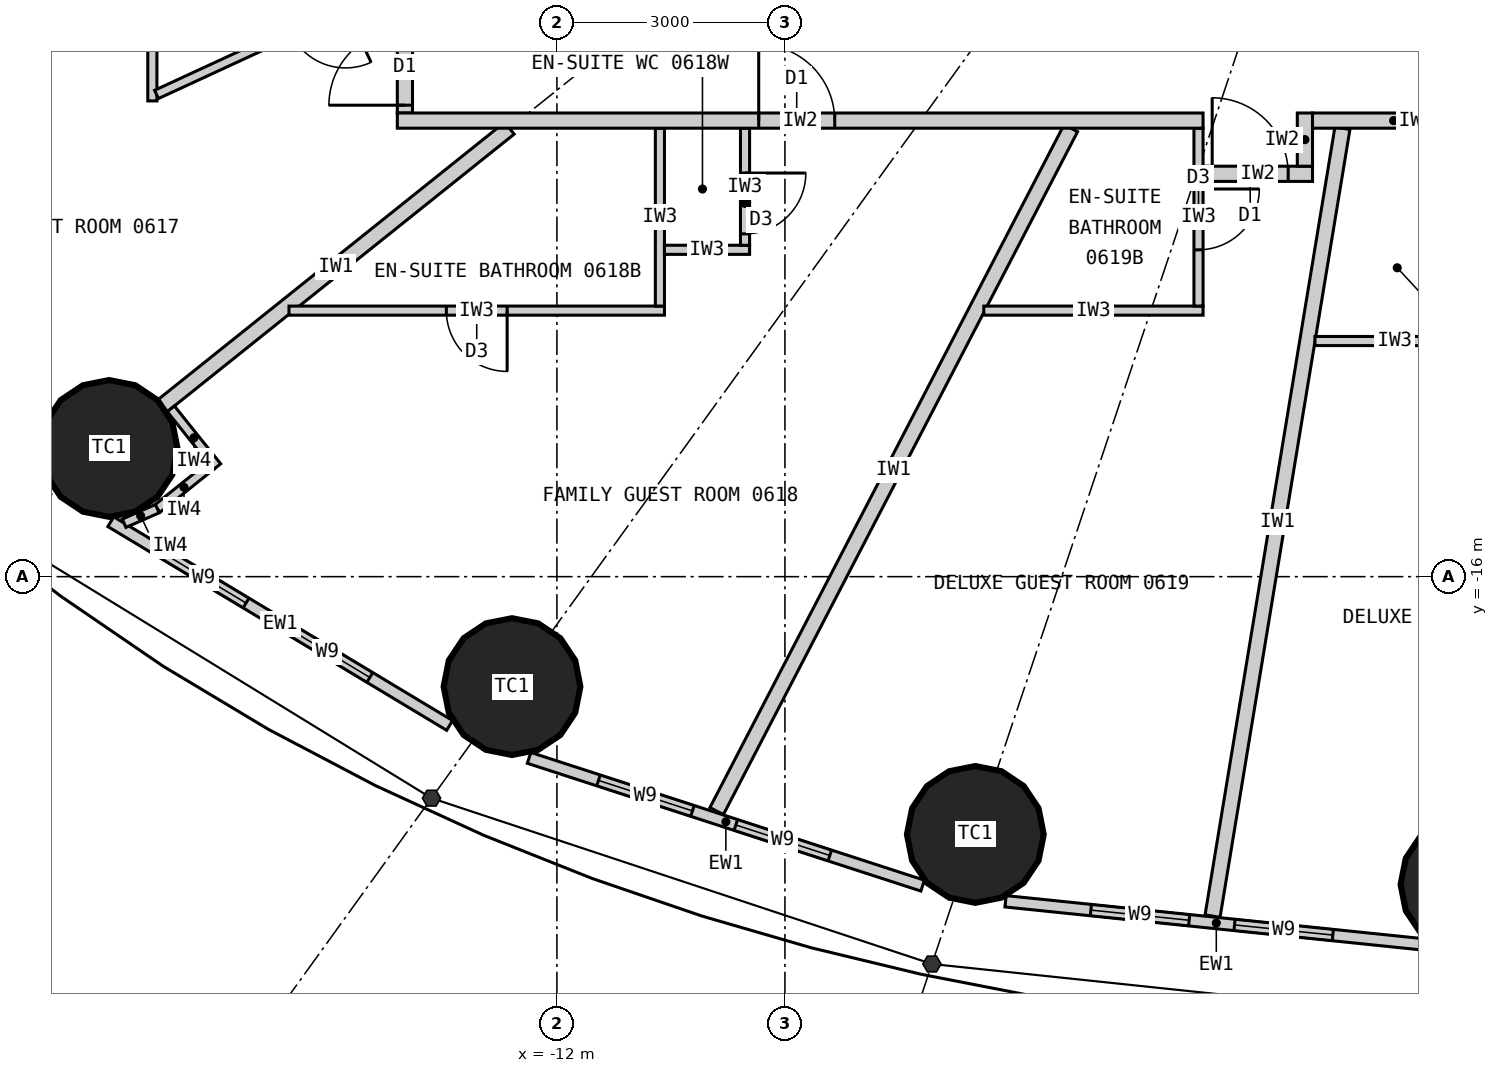
"""IFC4 building model, lengths in metres.
Left out: names, types, materials, properties, quantities, classifications, styles, units other than length and angle.
Written with IfcOpenShell. Run it as: python <this file> out.ifc"""

import sys

from ifc_helpers import new_model, si_unit, direction, frame, frame_2d, origin, origin_2d, place, context, subcontext, project, spatial, rectangle, circle, extrude, element, fill, save


model = new_model("IFC4")
c1 = context("Model", 3, precision=1e-05, world=origin(), true_north=direction((0.0, 1.0)))
c2 = subcontext(c1, "Body", "Model", "MODEL_VIEW")
j1 = project(units=[si_unit("LENGTHUNIT", "METRE"), si_unit("PLANEANGLEUNIT", "RADIAN")], contexts=[c1])
p1 = place(None, origin())
s1 = spatial("IfcSite", under=j1, at=p1, CompositionType="ELEMENT")
p2 = place(p1, origin())
s2 = spatial("IfcBuilding", under=s1, at=p2, CompositionType="ELEMENT")
p3 = place(p2, frame((0.0, 0.0, 32.7)))
s3 = spatial("IfcBuildingStorey", under=s2, at=p3, CompositionType="ELEMENT", Elevation=32.7)
for number, where, z_axis, x_axis in (
    (1, (-17.892, -14.313, 0.0), (0.0, 0.0, 1.0), (1.0, 0.0, 0.0)),
    (2, (-12.591, -17.447, 0.0), (0.0, 0.0, 1.0), (1.0, 0.0, 0.0)),
    (3, (-6.495, -19.391, 0.0), (0.0, 0.0, 1.0), (1.0, 0.0, 0.0)),
    (4, (0.0, -20.05, 0.0), (0.0, 0.0, 1.0), (1.0, 0.0, 0.0)),
):
    element("IfcColumn", number, at=place(p3, frame(where, z_axis=z_axis, x_axis=x_axis)), inside=s3, PredefinedType="COLUMN", context=c2, shape_type="SweptSolid", body=[
        extrude(circle(Radius=0.9, at=origin_2d()), origin(), (0.0, 0.0, 1.0), 3.3),
    ])
p4 = place(p3, frame((-17.869, -15.277, 0.0), z_axis=(0.0, 0.0, 1.0), x_axis=(0.856958191554, -0.515385931054, 0.0)))
e5 = element("IfcWall", 5, at=p4, inside=s3, PredefinedType="ELEMENTEDWALL", context=c2, shape_type="SweptSolid", body=[
    extrude(rectangle(XDim=5.201, YDim=0.15, at=frame_2d((2.601, 0.0))), origin(), (0.0, 0.0, 1.0), 3.12),
])
p5 = place(p4, frame((0.776, 0.0, 0.9)))
e6 = element("IfcOpeningElement", 6, at=p5, cuts=e5, PredefinedType="OPENING", context=c2, shape_type="SweptSolid", body=[
    extrude(rectangle(XDim=1.3, YDim=1.9, at=frame_2d((0.65, 0.95))), frame((0.0, 0.085, 0.0), z_axis=(0.0, -1.0, 0.0), x_axis=(1.0, 0.0, 0.0)), (0.0, 0.0, 1.0), 0.17),
])
p6 = place(p4, frame((2.676, 0.0, 0.9)))
e7 = element("IfcOpeningElement", 7, at=p6, cuts=e5, PredefinedType="OPENING", context=c2, shape_type="SweptSolid", body=[
    extrude(rectangle(XDim=1.3, YDim=1.9, at=frame_2d((0.65, 0.95))), frame((0.0, 0.085, 0.0), z_axis=(0.0, -1.0, 0.0), x_axis=(1.0, 0.0, 0.0)), (0.0, 0.0, 1.0), 0.17),
])
p7 = place(p3, frame((-12.366, -18.384, 0.0), z_axis=(0.0, 0.0, 1.0), x_axis=(0.951138486029, -0.308764603532, 0.0)))
e8 = element("IfcWall", 8, at=p7, inside=s3, PredefinedType="ELEMENTEDWALL", context=c2, shape_type="SweptSolid", body=[
    extrude(rectangle(XDim=5.444, YDim=0.15, at=frame_2d((2.722, 0.0))), origin(), (0.0, 0.0, 1.0), 3.12),
])
p8 = place(p7, frame((0.96, 0.0, 0.9)))
e9 = element("IfcOpeningElement", 9, at=p8, cuts=e8, PredefinedType="OPENING", context=c2, shape_type="SweptSolid", body=[
    extrude(rectangle(XDim=1.3, YDim=1.9, at=frame_2d((0.65, 0.95))), frame((0.0, 0.085, 0.0), z_axis=(0.0, -1.0, 0.0), x_axis=(1.0, 0.0, 0.0)), (0.0, 0.0, 1.0), 0.17),
])
p9 = place(p7, frame((2.86, 0.0, 0.9)))
e10 = element("IfcOpeningElement", 10, at=p9, cuts=e8, PredefinedType="OPENING", context=c2, shape_type="SweptSolid", body=[
    extrude(rectangle(XDim=1.3, YDim=1.9, at=frame_2d((0.65, 0.95))), frame((0.0, 0.085, 0.0), z_axis=(0.0, -1.0, 0.0), x_axis=(1.0, 0.0, 0.0)), (0.0, 0.0, 1.0), 0.17),
])
p10 = place(p3, frame((-6.098, -20.271, 0.0), z_axis=(0.0, 0.0, 1.0), x_axis=(0.994723735084, -0.102589915983, 0.0)))
e11 = element("IfcWall", 11, at=p10, inside=s3, PredefinedType="ELEMENTEDWALL", context=c2, shape_type="SweptSolid", body=[
    extrude(rectangle(XDim=5.576, YDim=0.15, at=frame_2d((2.788, 0.0))), origin(), (0.0, 0.0, 1.0), 3.12),
])
p11 = place(p10, frame((1.129, 0.0, 0.9)))
e12 = element("IfcOpeningElement", 12, at=p11, cuts=e11, PredefinedType="OPENING", context=c2, shape_type="SweptSolid", body=[
    extrude(rectangle(XDim=1.3, YDim=1.9, at=frame_2d((0.65, 0.95))), frame((0.0, 0.085, 0.0), z_axis=(0.0, -1.0, 0.0), x_axis=(1.0, 0.0, 0.0)), (0.0, 0.0, 1.0), 0.17),
])
p12 = place(p10, frame((3.029, 0.0, 0.9)))
e13 = element("IfcOpeningElement", 13, at=p12, cuts=e11, PredefinedType="OPENING", context=c2, shape_type="SweptSolid", body=[
    extrude(rectangle(XDim=1.3, YDim=1.9, at=frame_2d((0.65, 0.95))), frame((0.0, 0.085, 0.0), z_axis=(0.0, -1.0, 0.0), x_axis=(1.0, 0.0, 0.0)), (0.0, 0.0, 1.0), 0.17),
])
p13 = place(p3, frame((-14.1, -6.512, 0.0), z_axis=(0.0, 0.0, 1.0), x_axis=(-0.907842433118, -0.41931147925, 0.0)))
e14 = element("IfcWall", 14, at=p13, inside=s3, PredefinedType="PARTITIONING", context=c2, shape_type="SweptSolid", body=[
    extrude(rectangle(XDim=7.823, YDim=0.2, at=frame_2d((3.912, 0.0))), origin(), (0.0, 0.0, 1.0), 2.32),
])
p14 = place(p3, frame((-12.625, -10.1, 0.0), z_axis=(0.0, 0.0, 1.0), x_axis=(-0.780872884676, -0.624689953479, 0.0)))
e15 = element("IfcWall", 15, at=p14, inside=s3, PredefinedType="PARTITIONING", context=c2, shape_type="SweptSolid", body=[
    extrude(rectangle(XDim=5.845, YDim=0.2, at=frame_2d((2.922, 0.0))), origin(), (0.0, 0.0, 1.0), 2.32),
])
p15 = place(p3, frame((-5.239, -10.1, 0.0), z_axis=(0.0, 0.0, 1.0), x_axis=(-0.460422783389, -0.887699758103, 0.0)))
e16 = element("IfcWall", 16, at=p15, inside=s3, PredefinedType="PARTITIONING", context=c2, shape_type="SweptSolid", body=[
    extrude(rectangle(XDim=10.12, YDim=0.2, at=frame_2d((5.06, 0.0))), origin(), (0.0, 0.0, 1.0), 3.12),
])
p16 = place(p3, frame((-1.665, -10.1, 0.0), z_axis=(0.0, 0.0, 1.0), x_axis=(-0.162657606458, -0.986682574621, 0.0)))
e17 = element("IfcWall", 17, at=p16, inside=s3, PredefinedType="PARTITIONING", context=c2, shape_type="SweptSolid", body=[
    extrude(rectangle(XDim=10.505, YDim=0.2, at=frame_2d((5.252, 0.0))), origin(), (0.0, 0.0, 1.0), 3.12),
])
p17 = place(p3, frame((-17.323, -8.101, 0.0), z_axis=(0.0, 0.0, 1.0), x_axis=(0.0, -1.0, 0.0)))
e18 = element("IfcWall", 18, at=p17, inside=s3, PredefinedType="PARTITIONING", context=c2, shape_type="SweptSolid", body=[
    extrude(rectangle(XDim=1.64, YDim=0.12, at=frame_2d((0.82, 0.0))), origin(), (0.0, 0.0, 1.0), 3.12),
])
p18 = place(p3, frame((-14.1, -8.193, 0.0), z_axis=(0.0, 0.0, 1.0), x_axis=(-0.907836493557, -0.419324338628, 0.0)))
e19 = element("IfcWall", 19, at=p18, inside=s3, PredefinedType="PARTITIONING", context=c2, shape_type="SweptSolid", body=[
    extrude(rectangle(XDim=3.49, YDim=0.12, at=frame_2d((1.745, 0.0))), origin(), (0.0, 0.0, 1.0), 3.12),
])
p19 = place(p18, frame((0.75, 0.0, 0.0)))
e20 = element("IfcOpeningElement", 20, at=p19, cuts=e19, PredefinedType="OPENING", context=c2, shape_type="SweptSolid", body=[
    extrude(rectangle(XDim=0.8, YDim=2.1, at=frame_2d((0.4, 1.05))), frame((0.0, 0.07, 0.0), z_axis=(0.0, -1.0, 0.0), x_axis=(1.0, 0.0, 0.0)), (0.0, 0.0, 1.0), 0.14),
])
p20 = place(p3, frame((-15.525, -12.5, 0.0), z_axis=(0.0, 0.0, 1.0), x_axis=(1.0, 0.0, 0.0)))
e21 = element("IfcWall", 21, at=p20, inside=s3, PredefinedType="PARTITIONING", context=c2, shape_type="SweptSolid", body=[
    extrude(rectangle(XDim=4.94, YDim=0.12, at=frame_2d((2.47, 0.0))), origin(), (0.0, 0.0, 1.0), 3.12),
])
p21 = place(p20, frame((2.07, 0.0, 0.0)))
e22 = element("IfcOpeningElement", 22, at=p21, cuts=e21, PredefinedType="OPENING", context=c2, shape_type="SweptSolid", body=[
    extrude(rectangle(XDim=0.8, YDim=2.1, at=frame_2d((0.4, 1.05))), frame((0.0, 0.07, 0.0), z_axis=(0.0, -1.0, 0.0), x_axis=(1.0, 0.0, 0.0)), (0.0, 0.0, 1.0), 0.14),
])
p22 = place(p3, frame((-10.645, -10.1, 0.0), z_axis=(0.0, 0.0, 1.0), x_axis=(0.0, -1.0, 0.0)))
e23 = element("IfcWall", 23, at=p22, inside=s3, PredefinedType="PARTITIONING", context=c2, shape_type="SweptSolid", body=[
    extrude(rectangle(XDim=2.34, YDim=0.12, at=frame_2d((1.17, 0.0))), origin(), (0.0, 0.0, 1.0), 3.12),
])
p23 = place(p3, frame((-10.585, -11.7, 0.0), z_axis=(0.0, 0.0, 1.0), x_axis=(1.0, 0.0, 0.0)))
e24 = element("IfcWall", 24, at=p23, inside=s3, PredefinedType="PARTITIONING", context=c2, shape_type="SweptSolid", body=[
    extrude(rectangle(XDim=1.12, YDim=0.12, at=frame_2d((0.56, 0.0))), origin(), (0.0, 0.0, 1.0), 3.12),
])
p24 = place(p3, frame((-9.525, -10.1, 0.0), z_axis=(0.0, 0.0, 1.0), x_axis=(0.0, -1.0, 0.0)))
e25 = element("IfcWall", 25, at=p24, inside=s3, PredefinedType="PARTITIONING", context=c2, shape_type="SweptSolid", body=[
    extrude(rectangle(XDim=1.54, YDim=0.12, at=frame_2d((0.77, 0.0))), origin(), (0.0, 0.0, 1.0), 3.12),
])
p25 = place(p24, frame((0.59, 0.0, 0.0)))
e26 = element("IfcOpeningElement", 26, at=p25, cuts=e25, PredefinedType="OPENING", context=c2, shape_type="SweptSolid", body=[
    extrude(rectangle(XDim=0.8, YDim=2.1, at=frame_2d((0.4, 1.05))), frame((0.0, 0.07, 0.0), z_axis=(0.0, -1.0, 0.0), x_axis=(1.0, 0.0, 0.0)), (0.0, 0.0, 1.0), 0.14),
])
p26 = place(p3, frame((-6.383, -12.5, 0.0), z_axis=(0.0, 0.0, 1.0), x_axis=(1.0, 0.0, 0.0)))
e27 = element("IfcWall", 27, at=p26, inside=s3, PredefinedType="PARTITIONING", context=c2, shape_type="SweptSolid", body=[
    extrude(rectangle(XDim=2.885, YDim=0.12, at=frame_2d((1.442, 0.0))), origin(), (0.0, 0.0, 1.0), 3.12),
])
p27 = place(p3, frame((-3.559, -10.1, 0.0), z_axis=(0.0, 0.0, 1.0), x_axis=(0.0, -1.0, 0.0)))
e28 = element("IfcWall", 28, at=p27, inside=s3, PredefinedType="PARTITIONING", context=c2, shape_type="SweptSolid", body=[
    extrude(rectangle(XDim=2.34, YDim=0.12, at=frame_2d((1.17, 0.0))), origin(), (0.0, 0.0, 1.0), 3.12),
])
p28 = place(p27, frame((0.8, 0.0, 0.0)))
e29 = element("IfcOpeningElement", 29, at=p28, cuts=e28, PredefinedType="OPENING", context=c2, shape_type="SweptSolid", body=[
    extrude(rectangle(XDim=0.8, YDim=2.1, at=frame_2d((0.4, 1.05))), frame((0.0, 0.07, 0.0), z_axis=(0.0, -1.0, 0.0), x_axis=(1.0, 0.0, 0.0)), (0.0, 0.0, 1.0), 0.14),
])
p29 = place(p3, frame((-2.027, -12.9, 0.0), z_axis=(0.0, 0.0, 1.0), x_axis=(1.0, 0.0, 0.0)))
e30 = element("IfcWall", 30, at=p29, inside=s3, PredefinedType="PARTITIONING", context=c2, shape_type="SweptSolid", body=[
    extrude(rectangle(XDim=2.102, YDim=0.12, at=frame_2d((1.051, 0.0))), origin(), (0.0, 0.0, 1.0), 3.12),
])
p30 = place(p3, frame((-2.059, -10.7, 0.0), z_axis=(0.0, 0.0, 1.0), x_axis=(-1.0, 0.0, 0.0)))
e31 = element("IfcWall", 31, at=p30, inside=s3, PredefinedType="PARTITIONING", context=c2, shape_type="SweptSolid", body=[
    extrude(rectangle(XDim=1.44, YDim=0.2, at=frame_2d((0.72, 0.0))), origin(), (0.0, 0.0, 1.0), 3.12),
])
p31 = place(p30, frame((0.32, 0.0, 0.0)))
e32 = element("IfcOpeningElement", 32, at=p31, cuts=e31, PredefinedType="OPENING", context=c2, shape_type="SweptSolid", body=[
    extrude(rectangle(XDim=1.0, YDim=2.2, at=frame_2d((0.5, 1.1))), frame((0.0, 0.11, 0.0), z_axis=(0.0, -1.0, 0.0), x_axis=(1.0, 0.0, 0.0)), (0.0, 0.0, 1.0), 0.22),
])
p32 = place(p3, frame((-2.159, -9.9, 0.0), z_axis=(0.0, 0.0, 1.0), x_axis=(0.0, -1.0, 0.0)))
e33 = element("IfcWall", 33, at=p32, inside=s3, PredefinedType="PARTITIONING", context=c2, shape_type="SweptSolid", body=[
    extrude(rectangle(XDim=0.7, YDim=0.2, at=frame_2d((0.35, 0.0))), origin(), (0.0, 0.0, 1.0), 3.12),
])
p33 = place(p3, frame((-14.0, -4.772, 0.0), z_axis=(0.0, 0.0, 1.0), x_axis=(0.0, -1.0, 0.0)))
e34 = element("IfcWall", 34, at=p33, inside=s3, PredefinedType="PARTITIONING", context=c2, shape_type="SweptSolid", body=[
    extrude(rectangle(XDim=5.127, YDim=0.2, at=frame_2d((2.564, 0.0))), origin(), (0.0, 0.0, 1.0), 3.12),
])
p34 = place(p33, frame((4.025, 0.0, 0.0)))
e35 = element("IfcOpeningElement", 35, at=p34, cuts=e34, PredefinedType="OPENING", context=c2, shape_type="SweptSolid", body=[
    extrude(rectangle(XDim=1.0, YDim=2.2, at=frame_2d((0.5, 1.1))), frame((0.0, 0.11, 0.0), z_axis=(0.0, -1.0, 0.0), x_axis=(1.0, 0.0, 0.0)), (0.0, 0.0, 1.0), 0.22),
])
p35 = place(p3, frame((0.075, -10.0, 0.0), z_axis=(0.0, 0.0, 1.0), x_axis=(-1.0, 0.0, 0.0)))
e36 = element("IfcWall", 36, at=p35, inside=s3, PredefinedType="PARTITIONING", context=c2, shape_type="SweptSolid", body=[
    extrude(rectangle(XDim=2.134, YDim=0.2, at=frame_2d((1.067, 0.0))), origin(), (0.0, 0.0, 1.0), 3.12),
])
p36 = place(p3, frame((-3.499, -10.0, 0.0), z_axis=(0.0, 0.0, 1.0), x_axis=(-1.0, 0.0, 0.0)))
e37 = element("IfcWall", 37, at=p36, inside=s3, PredefinedType="PARTITIONING", context=c2, shape_type="SweptSolid", body=[
    extrude(rectangle(XDim=10.602, YDim=0.2, at=frame_2d((5.301, 0.0))), origin(), (0.0, 0.0, 1.0), 3.12),
])
p37 = place(p36, frame((4.846, 0.0, 0.0)))
e38 = element("IfcOpeningElement", 38, at=p37, cuts=e37, PredefinedType="OPENING", context=c2, shape_type="SweptSolid", body=[
    extrude(rectangle(XDim=1.0, YDim=2.2, at=frame_2d((0.5, 1.1))), frame((0.0, 0.11, 0.0), z_axis=(0.0, -1.0, 0.0), x_axis=(1.0, 0.0, 0.0)), (0.0, 0.0, 1.0), 0.22),
])
p38 = place(p3, frame((-17.08, -13.792, 0.0), z_axis=(0.0, 0.0, 1.0), x_axis=(0.624756144097, -0.780819928289, 0.0)))
e39 = element("IfcWall", 39, at=p38, inside=s3, PredefinedType="PARTITIONING", context=c2, shape_type="SweptSolid", body=[
    extrude(rectangle(XDim=0.975, YDim=0.12, at=frame_2d((0.487, 0.0))), origin(), (0.0, 0.0, 1.0), 3.12),
])
p39 = place(p3, frame((-16.555, -14.543, 0.0), z_axis=(0.0, 0.0, 1.0), x_axis=(-0.780789399477, -0.62479429708, 0.0)))
e40 = element("IfcWall", 40, at=p39, inside=s3, PredefinedType="PARTITIONING", context=c2, shape_type="SweptSolid", body=[
    extrude(rectangle(XDim=0.9, YDim=0.12, at=frame_2d((0.45, 0.0))), origin(), (0.0, 0.0, 1.0), 3.12),
])
p40 = place(p3, frame((-17.258, -15.106, 0.0), z_axis=(0.0, 0.0, 1.0), x_axis=(-0.916098562583, -0.400953143937, 0.0)))
e41 = element("IfcWall", 41, at=p40, inside=s3, PredefinedType="PARTITIONING", context=c2, shape_type="SweptSolid", body=[
    extrude(rectangle(XDim=0.477, YDim=0.12, at=frame_2d((0.238, 0.0))), origin(), (0.0, 0.0, 1.0), 3.12),
])
p41 = place(p5, origin())
e42 = element("IfcWindow", 42, at=p41, inside=s3, PartitioningType="SINGLE_PANEL", PredefinedType="WINDOW", context=c2, shape_type="SweptSolid", body=[
    extrude(rectangle(XDim=1.3, YDim=1.9, at=frame_2d((0.65, 0.95))), frame((0.0, 0.03, 0.0), z_axis=(0.0, -1.0, 0.0), x_axis=(1.0, 0.0, 0.0)), (0.0, 0.0, 1.0), 0.06),
])
fill(e6, e42)
p42 = place(p6, origin())
e43 = element("IfcWindow", 43, at=p42, inside=s3, PartitioningType="SINGLE_PANEL", PredefinedType="WINDOW", context=c2, shape_type="SweptSolid", body=[
    extrude(rectangle(XDim=1.3, YDim=1.9, at=frame_2d((0.65, 0.95))), frame((0.0, 0.03, 0.0), z_axis=(0.0, -1.0, 0.0), x_axis=(1.0, 0.0, 0.0)), (0.0, 0.0, 1.0), 0.06),
])
fill(e7, e43)
p43 = place(p8, origin())
e44 = element("IfcWindow", 44, at=p43, inside=s3, PartitioningType="SINGLE_PANEL", PredefinedType="WINDOW", context=c2, shape_type="SweptSolid", body=[
    extrude(rectangle(XDim=1.3, YDim=1.9, at=frame_2d((0.65, 0.95))), frame((0.0, 0.03, 0.0), z_axis=(0.0, -1.0, 0.0), x_axis=(1.0, 0.0, 0.0)), (0.0, 0.0, 1.0), 0.06),
])
fill(e9, e44)
p44 = place(p9, origin())
e45 = element("IfcWindow", 45, at=p44, inside=s3, PartitioningType="SINGLE_PANEL", PredefinedType="WINDOW", context=c2, shape_type="SweptSolid", body=[
    extrude(rectangle(XDim=1.3, YDim=1.9, at=frame_2d((0.65, 0.95))), frame((0.0, 0.03, 0.0), z_axis=(0.0, -1.0, 0.0), x_axis=(1.0, 0.0, 0.0)), (0.0, 0.0, 1.0), 0.06),
])
fill(e10, e45)
p45 = place(p11, origin())
e46 = element("IfcWindow", 46, at=p45, inside=s3, PartitioningType="SINGLE_PANEL", PredefinedType="WINDOW", context=c2, shape_type="SweptSolid", body=[
    extrude(rectangle(XDim=1.3, YDim=1.9, at=frame_2d((0.65, 0.95))), frame((0.0, 0.03, 0.0), z_axis=(0.0, -1.0, 0.0), x_axis=(1.0, 0.0, 0.0)), (0.0, 0.0, 1.0), 0.06),
])
fill(e12, e46)
p46 = place(p12, origin())
e47 = element("IfcWindow", 47, at=p46, inside=s3, PartitioningType="SINGLE_PANEL", PredefinedType="WINDOW", context=c2, shape_type="SweptSolid", body=[
    extrude(rectangle(XDim=1.3, YDim=1.9, at=frame_2d((0.65, 0.95))), frame((0.0, 0.03, 0.0), z_axis=(0.0, -1.0, 0.0), x_axis=(1.0, 0.0, 0.0)), (0.0, 0.0, 1.0), 0.06),
])
fill(e13, e47)
p47 = place(p34, origin())
e48 = element("IfcDoor", 48, at=p47, inside=s3, OperationType="SINGLE_SWING_RIGHT", PredefinedType="DOOR", context=c2, shape_type="SweptSolid", body=[
    extrude(rectangle(XDim=1.0, YDim=2.2, at=frame_2d((0.5, 1.1))), frame((0.0, 0.025, 0.0), z_axis=(0.0, -1.0, 0.0), x_axis=(1.0, 0.0, 0.0)), (0.0, 0.0, 1.0), 0.05),
])
fill(e35, e48)
p48 = place(p21, origin())
e49 = element("IfcDoor", 49, at=p48, inside=s3, OperationType="SINGLE_SWING_RIGHT", PredefinedType="DOOR", context=c2, shape_type="SweptSolid", body=[
    extrude(rectangle(XDim=0.8, YDim=2.1, at=frame_2d((0.4, 1.05))), frame((0.0, 0.025, 0.0), z_axis=(0.0, -1.0, 0.0), x_axis=(1.0, 0.0, 0.0)), (0.0, 0.0, 1.0), 0.05),
])
fill(e22, e49)
p49 = place(p25, origin())
e50 = element("IfcDoor", 50, at=p49, inside=s3, OperationType="SINGLE_SWING_LEFT", PredefinedType="DOOR", context=c2, shape_type="SweptSolid", body=[
    extrude(rectangle(XDim=0.8, YDim=2.1, at=frame_2d((0.4, 1.05))), frame((0.0, 0.025, 0.0), z_axis=(0.0, -1.0, 0.0), x_axis=(1.0, 0.0, 0.0)), (0.0, 0.0, 1.0), 0.05),
])
fill(e26, e50)
p50 = place(p37, origin())
e51 = element("IfcDoor", 51, at=p50, inside=s3, OperationType="SINGLE_SWING_RIGHT", PredefinedType="DOOR", context=c2, shape_type="SweptSolid", body=[
    extrude(rectangle(XDim=1.0, YDim=2.2, at=frame_2d((0.5, 1.1))), frame((0.0, 0.025, 0.0), z_axis=(0.0, -1.0, 0.0), x_axis=(1.0, 0.0, 0.0)), (0.0, 0.0, 1.0), 0.05),
])
fill(e38, e51)
p51 = place(p28, origin())
e52 = element("IfcDoor", 52, at=p51, inside=s3, OperationType="SINGLE_SWING_LEFT", PredefinedType="DOOR", context=c2, shape_type="SweptSolid", body=[
    extrude(rectangle(XDim=0.8, YDim=2.1, at=frame_2d((0.4, 1.05))), frame((0.0, 0.025, 0.0), z_axis=(0.0, -1.0, 0.0), x_axis=(1.0, 0.0, 0.0)), (0.0, 0.0, 1.0), 0.05),
])
fill(e29, e52)
p52 = place(p31, origin())
e53 = element("IfcDoor", 53, at=p52, inside=s3, OperationType="SINGLE_SWING_RIGHT", PredefinedType="DOOR", context=c2, shape_type="SweptSolid", body=[
    extrude(rectangle(XDim=1.0, YDim=2.2, at=frame_2d((0.5, 1.1))), frame((0.0, 0.025, 0.0), z_axis=(0.0, -1.0, 0.0), x_axis=(1.0, 0.0, 0.0)), (0.0, 0.0, 1.0), 0.05),
])
fill(e32, e53)
save(model, sys.argv[1])
